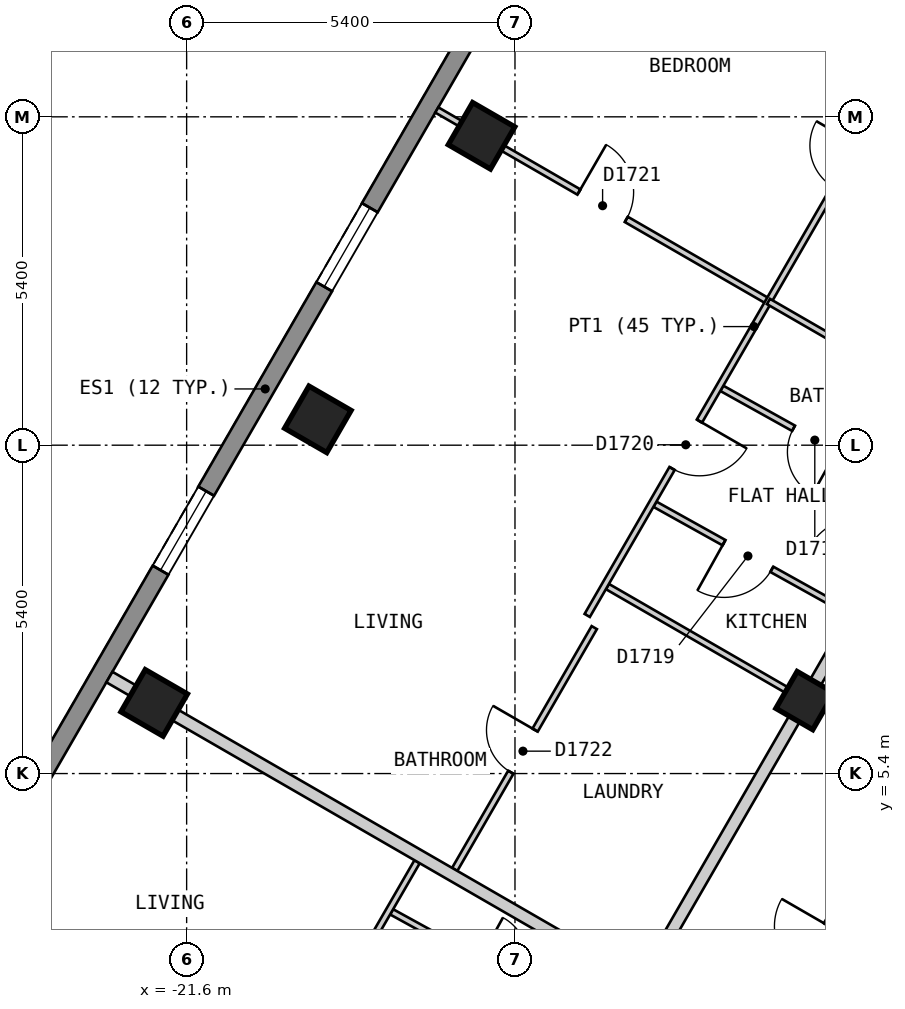
"""IFC4 building model, lengths in metres.
Left out: names, types, materials, properties, quantities, classifications, styles, units other than length and angle.
Written with IfcOpenShell. Run it as: python <this file> out.ifc"""

import sys

from ifc_helpers import new_model, si_unit, direction, frame, frame_2d, origin, origin_2d, place, context, subcontext, project, spatial, polyline, rectangle, outline, extrude, element, fill, save


model = new_model("IFC4")
c1 = context("Model", 3, precision=1e-05, world=origin(), true_north=direction((0.0, 1.0)))
c2 = subcontext(c1, "Body", "Model", "MODEL_VIEW")
j1 = project(units=[si_unit("LENGTHUNIT", "METRE"), si_unit("PLANEANGLEUNIT", "RADIAN")], contexts=[c1])
p1 = place(None, origin())
s1 = spatial("IfcSite", under=j1, at=p1, CompositionType="ELEMENT")
p2 = place(p1, origin())
s2 = spatial("IfcBuilding", under=s1, at=p2, CompositionType="ELEMENT")
p3 = place(p2, frame((0.0, 0.0, 187.2)))
s3 = spatial("IfcBuildingStorey", under=s2, at=p3, CompositionType="ELEMENT", Elevation=187.2)
for number, where, z_axis, x_axis in (
    (1, (-16.75, 15.888, 0.0), (0.0, 0.0, 1.0), (-0.5, -0.866, 0.0)),
    (2, (-19.442, 11.225, 0.0), (0.0, 0.0, 1.0), (-0.5, -0.866, 0.0)),
    (3, (-22.134, 6.562, 0.0), (0.0, 0.0, 1.0), (-0.5, -0.866, 0.0)),
):
    element("IfcColumn", number, at=place(p3, frame(where, z_axis=z_axis, x_axis=x_axis)), inside=s3, PredefinedType="COLUMN", context=c2, shape_type="SweptSolid", body=[
        extrude(rectangle(XDim=0.8, YDim=0.8, at=origin_2d()), origin(), (0.0, 0.0, 1.0), 3.0),
    ])
p4 = place(p3, frame((-11.431, 6.6, 0.0), z_axis=(0.0, 0.0, 1.0), x_axis=(-0.5, -0.866025403784, 0.0)))
e4 = element("IfcColumn", 4, at=p4, inside=s3, PredefinedType="COLUMN", context=c2, shape_type="SweptSolid", body=[
    extrude(rectangle(XDim=0.7, YDim=0.7, at=origin_2d()), origin(), (0.0, 0.0, 1.0), 3.0),
])
p5 = place(p3, frame((-14.592, 21.625, 0.0), z_axis=(0.0, 0.0, 1.0), x_axis=(-0.500010537973, -0.866019319597, 0.0)))
e5 = element("IfcWall", 5, at=p5, inside=s3, PredefinedType="SOLIDWALL", context=c2, shape_type="SweptSolid", body=[
    extrude(outline(polyline([(0.0, -0.15), (22.863, -0.15), (22.783, 0.15), (0.08, 0.15), (0.0, -0.15)])), origin(), (0.0, 0.0, 1.0), 2.7),
])
p6 = place(p5, frame((2.606, 0.0, 0.15)))
e6 = element("IfcOpeningElement", 6, at=p6, cuts=e5, PredefinedType="OPENING", context=c2, shape_type="SweptSolid", body=[
    extrude(rectangle(XDim=1.5, YDim=2.1, at=frame_2d((0.75, 1.05))), frame((0.0, 0.16, 0.0), z_axis=(0.0, -1.0, 0.0), x_axis=(1.0, 0.0, 0.0)), (0.0, 0.0, 1.0), 0.32),
])
p7 = place(p5, frame((7.99, 0.0, 0.15)))
e7 = element("IfcOpeningElement", 7, at=p7, cuts=e5, PredefinedType="OPENING", context=c2, shape_type="SweptSolid", body=[
    extrude(rectangle(XDim=1.5, YDim=2.1, at=frame_2d((0.75, 1.05))), frame((0.0, 0.16, 0.0), z_axis=(0.0, -1.0, 0.0), x_axis=(1.0, 0.0, 0.0)), (0.0, 0.0, 1.0), 0.32),
])
p8 = place(p5, frame((13.373, 0.0, 0.15)))
e8 = element("IfcOpeningElement", 8, at=p8, cuts=e5, PredefinedType="OPENING", context=c2, shape_type="SweptSolid", body=[
    extrude(rectangle(XDim=1.5, YDim=2.1, at=frame_2d((0.75, 1.05))), frame((0.0, 0.16, 0.0), z_axis=(0.0, -1.0, 0.0), x_axis=(1.0, 0.0, 0.0)), (0.0, 0.0, 1.0), 0.32),
])
p9 = place(p5, frame((18.758, 0.0, 0.15)))
e9 = element("IfcOpeningElement", 9, at=p9, cuts=e5, PredefinedType="OPENING", context=c2, shape_type="SweptSolid", body=[
    extrude(rectangle(XDim=1.5, YDim=2.1, at=frame_2d((0.75, 1.05))), frame((0.0, 0.16, 0.0), z_axis=(0.0, -1.0, 0.0), x_axis=(1.0, 0.0, 0.0)), (0.0, 0.0, 1.0), 0.32),
])
p10 = place(p3, frame((-13.048, -0.601, 0.0), z_axis=(0.0, 0.0, 1.0), x_axis=(0.499982180423, 0.866035691677, 0.0)))
e10 = element("IfcWall", 10, at=p10, inside=s3, PredefinedType="PARTITIONING", context=c2, shape_type="SweptSolid", body=[
    extrude(rectangle(XDim=7.16, YDim=0.2, at=frame_2d((3.58, 0.0))), origin(), (0.0, 0.0, 1.0), 2.7),
])
p11 = place(p10, frame((3.13, 0.0, 0.0)))
e11 = element("IfcOpeningElement", 11, at=p11, cuts=e10, PredefinedType="OPENING", context=c2, shape_type="SweptSolid", body=[
    extrude(rectangle(XDim=0.9, YDim=2.1, at=frame_2d((0.45, 1.05))), frame((0.0, 0.11, 0.0), z_axis=(0.0, -1.0, 0.0), x_axis=(1.0, 0.0, 0.0)), (0.0, 0.0, 1.0), 0.22),
])
p12 = place(p3, frame((-15.53, -0.501, 0.0), z_axis=(0.0, 0.0, 1.0), x_axis=(0.499952498232, 0.866052827206, 0.0)))
e12 = element("IfcWall", 12, at=p12, inside=s3, PredefinedType="PARTITIONING", context=c2, shape_type="SweptSolid", body=[
    extrude(rectangle(XDim=9.585, YDim=0.2, at=frame_2d((4.792, 0.0))), origin(), (0.0, 0.0, 1.0), 2.7),
])
p13 = place(p12, frame((0.525, 0.0, 0.0)))
e13 = element("IfcOpeningElement", 13, at=p13, cuts=e12, PredefinedType="OPENING", context=c2, shape_type="SweptSolid", body=[
    extrude(rectangle(XDim=1.0, YDim=2.1, at=frame_2d((0.5, 1.05))), frame((0.0, 0.11, 0.0), z_axis=(0.0, -1.0, 0.0), x_axis=(1.0, 0.0, 0.0)), (0.0, 0.0, 1.0), 0.22),
])
p14 = place(p3, frame((-18.229, 3.126, 0.0), z_axis=(0.0, 0.0, 1.0), x_axis=(0.876123002581, -0.482087631399, 0.0)))
e14 = element("IfcWall", 14, at=p14, inside=s3, PredefinedType="PARTITIONING", context=c2, shape_type="SweptSolid", body=[
    extrude(rectangle(XDim=4.051, YDim=0.1, at=frame_2d((2.025, 0.0))), origin(), (0.0, 0.0, 1.0), 2.7),
])
p15 = place(p14, frame((1.65, 0.0, 0.0)))
e15 = element("IfcOpeningElement", 15, at=p15, cuts=e14, PredefinedType="OPENING", context=c2, shape_type="SweptSolid", body=[
    extrude(rectangle(XDim=0.8, YDim=2.1, at=frame_2d((0.4, 1.05))), frame((0.0, 0.06, 0.0), z_axis=(0.0, -1.0, 0.0), x_axis=(1.0, 0.0, 0.0)), (0.0, 0.0, 1.0), 0.12),
])
p16 = place(p3, frame((-12.798, 11.735, 0.0), z_axis=(0.0, 0.0, 1.0), x_axis=(0.873649600774, -0.486555623816, 0.0)))
e16 = element("IfcWall", 16, at=p16, inside=s3, PredefinedType="PARTITIONING", context=c2, shape_type="SweptSolid", body=[
    extrude(rectangle(XDim=3.451, YDim=0.1, at=frame_2d((1.726, 0.0))), origin(), (0.0, 0.0, 1.0), 2.7),
])
p17 = place(p16, frame((1.35, 0.0, 0.0)))
e17 = element("IfcOpeningElement", 17, at=p17, cuts=e16, PredefinedType="OPENING", context=c2, shape_type="SweptSolid", body=[
    extrude(rectangle(XDim=0.8, YDim=2.1, at=frame_2d((0.4, 1.05))), frame((0.0, 0.06, 0.0), z_axis=(0.0, -1.0, 0.0), x_axis=(1.0, 0.0, 0.0)), (0.0, 0.0, 1.0), 0.12),
])
p18 = place(p3, frame((-13.898, 9.829, 0.0), z_axis=(0.0, 0.0, 1.0), x_axis=(0.873715787747, -0.486436760784, 0.0)))
e18 = element("IfcWall", 18, at=p18, inside=s3, PredefinedType="PARTITIONING", context=c2, shape_type="SweptSolid", body=[
    extrude(rectangle(XDim=3.55, YDim=0.1, at=frame_2d((1.775, 0.0))), origin(), (0.0, 0.0, 1.0), 2.7),
])
p19 = place(p18, frame((1.3, 0.0, 0.0)))
e19 = element("IfcOpeningElement", 19, at=p19, cuts=e18, PredefinedType="OPENING", context=c2, shape_type="SweptSolid", body=[
    extrude(rectangle(XDim=0.9, YDim=2.1, at=frame_2d((0.45, 1.05))), frame((0.0, 0.06, 0.0), z_axis=(0.0, -1.0, 0.0), x_axis=(1.0, 0.0, 0.0)), (0.0, 0.0, 1.0), 0.12),
])
p20 = place(p3, frame((-14.679, 8.475, 0.0), z_axis=(0.0, 0.0, 1.0), x_axis=(0.865995104784, -0.500052475737, 0.0)))
e20 = element("IfcWall", 20, at=p20, inside=s3, PredefinedType="PARTITIONING", context=c2, shape_type="SweptSolid", body=[
    extrude(rectangle(XDim=3.65, YDim=0.1, at=frame_2d((1.825, 0.0))), origin(), (0.0, 0.0, 1.0), 2.7),
])
p21 = place(p3, frame((-17.486, 16.313, 0.0), z_axis=(0.0, 0.0, 1.0), x_axis=(0.865997114097, -0.500048995975, 0.0)))
e21 = element("IfcWall", 21, at=p21, inside=s3, PredefinedType="PARTITIONING", context=c2, shape_type="SweptSolid", body=[
    extrude(rectangle(XDim=6.299, YDim=0.1, at=frame_2d((3.149, 0.0))), origin(), (0.0, 0.0, 1.0), 2.7),
])
p22 = place(p21, frame((2.699, 0.0, 0.0)))
e22 = element("IfcOpeningElement", 22, at=p22, cuts=e21, PredefinedType="OPENING", context=c2, shape_type="SweptSolid", body=[
    extrude(rectangle(XDim=0.9, YDim=2.1, at=frame_2d((0.45, 1.05))), frame((0.0, 0.06, 0.0), z_axis=(0.0, -1.0, 0.0), x_axis=(1.0, 0.0, 0.0)), (0.0, 0.0, 1.0), 0.12),
])
p23 = place(p3, frame((-17.191, 3.824, 0.0), z_axis=(0.0, 0.0, 1.0), x_axis=(0.499891250406, 0.866088181288, 0.0)))
e23 = element("IfcWall", 23, at=p23, inside=s3, PredefinedType="PARTITIONING", context=c2, shape_type="SweptSolid", body=[
    extrude(rectangle(XDim=4.591, YDim=0.1, at=frame_2d((2.295, 0.0))), origin(), (0.0, 0.0, 1.0), 2.7),
])
p24 = place(p23, frame((1.845, 0.0, 0.0)))
e24 = element("IfcOpeningElement", 24, at=p24, cuts=e23, PredefinedType="OPENING", context=c2, shape_type="SweptSolid", body=[
    extrude(rectangle(XDim=0.8, YDim=2.1, at=frame_2d((0.4, 1.05))), frame((0.0, 0.06, 0.0), z_axis=(0.0, -1.0, 0.0), x_axis=(1.0, 0.0, 0.0)), (0.0, 0.0, 1.0), 0.12),
])
p25 = place(p3, frame((-15.012, 8.0, 0.0), z_axis=(0.0, 0.0, 1.0), x_axis=(0.500047346826, 0.865998066356, 0.0)))
e25 = element("IfcWall", 25, at=p25, inside=s3, PredefinedType="PARTITIONING", context=c2, shape_type="SweptSolid", body=[
    extrude(rectangle(XDim=10.971, YDim=0.1, at=frame_2d((5.486, 0.0))), origin(), (0.0, 0.0, 1.0), 2.7),
])
p26 = place(p25, frame((2.791, 0.0, 0.0)))
e26 = element("IfcOpeningElement", 26, at=p26, cuts=e25, PredefinedType="OPENING", context=c2, shape_type="SweptSolid", body=[
    extrude(rectangle(XDim=0.9, YDim=2.1, at=frame_2d((0.45, 1.05))), frame((0.0, 0.06, 0.0), z_axis=(0.0, -1.0, 0.0), x_axis=(1.0, 0.0, 0.0)), (0.0, 0.0, 1.0), 0.12),
])
p27 = place(p25, frame((8.124, 0.0, 0.0)))
e27 = element("IfcOpeningElement", 27, at=p27, cuts=e25, PredefinedType="OPENING", context=c2, shape_type="SweptSolid", body=[
    extrude(rectangle(XDim=0.8, YDim=2.1, at=frame_2d((0.4, 1.05))), frame((0.0, 0.06, 0.0), z_axis=(0.0, -1.0, 0.0), x_axis=(1.0, 0.0, 0.0)), (0.0, 0.0, 1.0), 0.12),
])
p28 = place(p3, frame((-19.283, 1.4, 0.0), z_axis=(0.0, 0.0, 1.0), x_axis=(0.500160189342, 0.865932898669, 0.0)))
e28 = element("IfcWall", 28, at=p28, inside=s3, PredefinedType="PARTITIONING", context=c2, shape_type="SweptSolid", body=[
    extrude(rectangle(XDim=2.945, YDim=0.1, at=frame_2d((1.472, 0.0))), origin(), (0.0, 0.0, 1.0), 2.7),
])
p29 = place(p28, frame((0.721, 0.0, 0.0)))
e29 = element("IfcOpeningElement", 29, at=p29, cuts=e28, PredefinedType="OPENING", context=c2, shape_type="SweptSolid", body=[
    extrude(rectangle(XDim=0.9, YDim=2.1, at=frame_2d((0.45, 1.05))), frame((0.0, 0.06, 0.0), z_axis=(0.0, -1.0, 0.0), x_axis=(1.0, 0.0, 0.0)), (0.0, 0.0, 1.0), 0.12),
])
p30 = place(p3, frame((-22.87, 6.987, 0.0), z_axis=(0.0, 0.0, 1.0), x_axis=(0.866022959057, -0.500004234368, 0.0)))
e30 = element("IfcWall", 30, at=p30, inside=s3, PredefinedType="PARTITIONING", context=c2, shape_type="SweptSolid", body=[
    extrude(rectangle(XDim=10.0, YDim=0.2, at=frame_2d((5.0, 0.0))), origin(), (0.0, 0.0, 1.0), 2.7),
])
p31 = place(p3, frame((-12.031, 13.163, 0.0), z_axis=(0.0, 0.0, 1.0), x_axis=(0.86608920467, -0.499889477339, 0.0)))
e31 = element("IfcWall", 31, at=p31, inside=s3, PredefinedType="PARTITIONING", context=c2, shape_type="SweptSolid", body=[
    extrude(rectangle(XDim=3.501, YDim=0.1, at=frame_2d((1.75, 0.0))), origin(), (0.0, 0.0, 1.0), 2.7),
])
p32 = place(p7, origin())
e32 = element("IfcWindow", 32, at=p32, inside=s3, PartitioningType="SINGLE_PANEL", PredefinedType="WINDOW", context=c2, shape_type="SweptSolid", body=[
    extrude(rectangle(XDim=1.5, YDim=2.1, at=frame_2d((0.75, 1.05))), frame((0.0, 0.03, 0.0), z_axis=(0.0, -1.0, 0.0), x_axis=(1.0, 0.0, 0.0)), (0.0, 0.0, 1.0), 0.06),
])
fill(e7, e32)
p33 = place(p8, origin())
e33 = element("IfcWindow", 33, at=p33, inside=s3, PartitioningType="SINGLE_PANEL", PredefinedType="WINDOW", context=c2, shape_type="SweptSolid", body=[
    extrude(rectangle(XDim=1.5, YDim=2.1, at=frame_2d((0.75, 1.05))), frame((0.0, 0.03, 0.0), z_axis=(0.0, -1.0, 0.0), x_axis=(1.0, 0.0, 0.0)), (0.0, 0.0, 1.0), 0.06),
])
fill(e8, e33)
p34 = place(p17, origin())
e34 = element("IfcDoor", 34, at=p34, inside=s3, OperationType="SINGLE_SWING_RIGHT", PredefinedType="DOOR", context=c2, shape_type="SweptSolid", body=[
    extrude(rectangle(XDim=0.8, YDim=2.1, at=frame_2d((0.4, 1.05))), frame((0.0, 0.025, 0.0), z_axis=(0.0, -1.0, 0.0), x_axis=(1.0, 0.0, 0.0)), (0.0, 0.0, 1.0), 0.05),
])
fill(e17, e34)
p35 = place(p19, origin())
e35 = element("IfcDoor", 35, at=p35, inside=s3, OperationType="SINGLE_SWING_LEFT", PredefinedType="DOOR", context=c2, shape_type="SweptSolid", body=[
    extrude(rectangle(XDim=0.9, YDim=2.1, at=frame_2d((0.45, 1.05))), frame((0.0, 0.025, 0.0), z_axis=(0.0, -1.0, 0.0), x_axis=(1.0, 0.0, 0.0)), (0.0, 0.0, 1.0), 0.05),
])
fill(e19, e35)
p36 = place(p26, origin())
e36 = element("IfcDoor", 36, at=p36, inside=s3, OperationType="SINGLE_SWING_RIGHT", PredefinedType="DOOR", context=c2, shape_type="SweptSolid", body=[
    extrude(rectangle(XDim=0.9, YDim=2.1, at=frame_2d((0.45, 1.05))), frame((0.0, 0.025, 0.0), z_axis=(0.0, -1.0, 0.0), x_axis=(1.0, 0.0, 0.0)), (0.0, 0.0, 1.0), 0.05),
])
fill(e26, e36)
p37 = place(p22, origin())
e37 = element("IfcDoor", 37, at=p37, inside=s3, OperationType="SINGLE_SWING_LEFT", PredefinedType="DOOR", context=c2, shape_type="SweptSolid", body=[
    extrude(rectangle(XDim=0.9, YDim=2.1, at=frame_2d((0.45, 1.05))), frame((0.0, 0.025, 0.0), z_axis=(0.0, -1.0, 0.0), x_axis=(1.0, 0.0, 0.0)), (0.0, 0.0, 1.0), 0.05),
])
fill(e22, e37)
p38 = place(p24, origin())
e38 = element("IfcDoor", 38, at=p38, inside=s3, OperationType="SINGLE_SWING_RIGHT", PredefinedType="DOOR", context=c2, shape_type="SweptSolid", body=[
    extrude(rectangle(XDim=0.8, YDim=2.1, at=frame_2d((0.4, 1.05))), frame((0.0, 0.025, 0.0), z_axis=(0.0, -1.0, 0.0), x_axis=(1.0, 0.0, 0.0)), (0.0, 0.0, 1.0), 0.05),
])
fill(e24, e38)
p39 = place(p11, origin())
e39 = element("IfcDoor", 39, at=p39, inside=s3, OperationType="SINGLE_SWING_RIGHT", PredefinedType="DOOR", context=c2, shape_type="SweptSolid", body=[
    extrude(rectangle(XDim=0.9, YDim=2.1, at=frame_2d((0.45, 1.05))), frame((0.0, 0.025, 0.0), z_axis=(0.0, -1.0, 0.0), x_axis=(1.0, 0.0, 0.0)), (0.0, 0.0, 1.0), 0.05),
])
fill(e11, e39)
save(model, sys.argv[1])
